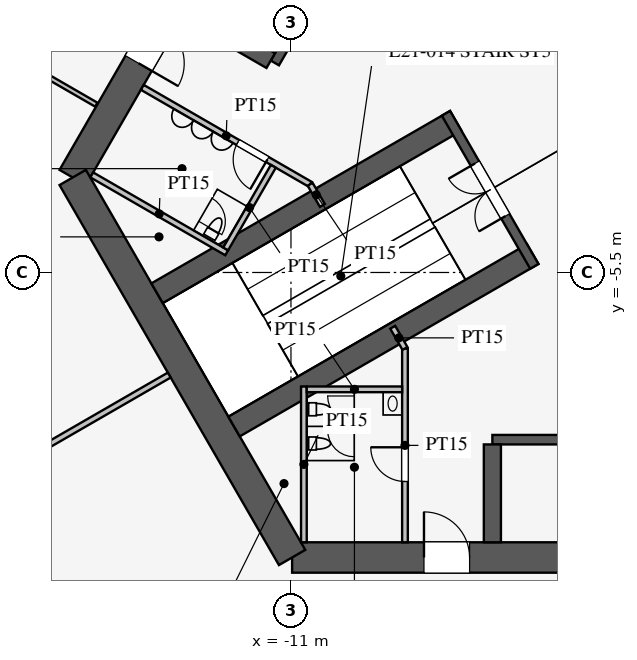
"""IFC4 building model, lengths in metres.
Left out: names, types, materials, properties, quantities, classifications, styles, units other than length and angle.
Written with IfcOpenShell. Run it as: python <this file> out.ifc"""

import sys

from ifc_helpers import new_model, si_unit, direction, frame, frame_2d, origin, place, context, subcontext, project, spatial, rectangle, extrude, element, fill, save


model = new_model("IFC4")
c1 = context("Model", 3, precision=1e-05, world=origin(), true_north=direction((0.0, 1.0)))
c2 = subcontext(c1, "Body", "Model", "MODEL_VIEW")
j1 = project(units=[si_unit("LENGTHUNIT", "METRE"), si_unit("PLANEANGLEUNIT", "RADIAN")], contexts=[c1])
p1 = place(None, origin())
s1 = spatial("IfcSite", under=j1, at=p1, CompositionType="ELEMENT")
p2 = place(p1, origin())
s2 = spatial("IfcBuilding", under=s1, at=p2, CompositionType="ELEMENT")
p3 = place(p2, frame((0.0, 0.0, 92.1)))
s3 = spatial("IfcBuildingStorey", under=s2, at=p3, CompositionType="ELEMENT", Elevation=92.1)
p4 = place(p3, frame((-10.97, -13.0, 0.0), z_axis=(0.0, 0.0, 1.0), x_axis=(1.0, 0.0, 0.0)))
e1 = element("IfcWall", 1, at=p4, inside=s3, PredefinedType="SHEAR", context=c2, shape_type="SweptSolid", body=[
    extrude(rectangle(XDim=21.939, YDim=0.8, at=frame_2d((10.97, 0.0))), origin(), (0.0, 0.0, 1.0), 6.0),
])
p5 = place(p4, frame((17.27, 0.0, 0.0)))
e2 = element("IfcOpeningElement", 2, at=p5, cuts=e1, PredefinedType="OPENING", context=c2, shape_type="SweptSolid", body=[
    extrude(rectangle(XDim=1.2, YDim=2.1, at=frame_2d((0.6, 1.05))), frame((0.0, 0.41, 0.0), z_axis=(0.0, -1.0, 0.0), x_axis=(1.0, 0.0, 0.0)), (0.0, 0.0, 1.0), 0.82),
])
p6 = place(p4, frame((3.47, 0.0, 0.0)))
e3 = element("IfcOpeningElement", 3, at=p6, cuts=e1, PredefinedType="OPENING", context=c2, shape_type="SweptSolid", body=[
    extrude(rectangle(XDim=1.2, YDim=2.1, at=frame_2d((0.6, 1.05))), frame((0.0, 0.41, 0.0), z_axis=(0.0, -1.0, 0.0), x_axis=(1.0, 0.0, 0.0)), (0.0, 0.0, 1.0), 0.82),
])
p7 = place(p3, frame((-5.773, 16.0, 0.0), z_axis=(0.0, 0.0, 1.0), x_axis=(-0.500002442456, -0.866023993627, 0.0)))
e4 = element("IfcWall", 4, at=p7, inside=s3, PredefinedType="SHEAR", context=c2, shape_type="SweptSolid", body=[
    extrude(rectangle(XDim=21.939, YDim=0.8, at=frame_2d((10.97, 0.0))), origin(), (0.0, 0.0, 1.0), 6.0),
])
p8 = place(p7, frame((17.27, 0.0, 0.0)))
e5 = element("IfcOpeningElement", 5, at=p8, cuts=e4, PredefinedType="OPENING", context=c2, shape_type="SweptSolid", body=[
    extrude(rectangle(XDim=1.2, YDim=2.1, at=frame_2d((0.6, 1.05))), frame((0.0, 0.41, 0.0), z_axis=(0.0, -1.0, 0.0), x_axis=(1.0, 0.0, 0.0)), (0.0, 0.0, 1.0), 0.82),
])
p9 = place(p7, frame((3.47, 0.0, 0.0)))
e6 = element("IfcOpeningElement", 6, at=p9, cuts=e4, PredefinedType="OPENING", context=c2, shape_type="SweptSolid", body=[
    extrude(rectangle(XDim=1.2, YDim=2.1, at=frame_2d((0.6, 1.05))), frame((0.0, 0.41, 0.0), z_axis=(0.0, -1.0, 0.0), x_axis=(1.0, 0.0, 0.0)), (0.0, 0.0, 1.0), 0.82),
])
p10 = place(p3, frame((-16.743, -3.0, 0.0), z_axis=(0.0, 0.0, 1.0), x_axis=(0.499995765644, -0.866027848477, 0.0)))
e7 = element("IfcWall", 7, at=p10, inside=s3, PredefinedType="SHEAR", context=c2, shape_type="SweptSolid", body=[
    extrude(rectangle(XDim=11.547, YDim=0.8, at=frame_2d((5.773, 0.0))), origin(), (0.0, 0.0, 1.0), 6.0),
])
p11 = place(p3, frame((-5.7, -9.9, 0.0), z_axis=(0.0, 0.0, 1.0), x_axis=(1.0, 0.0, 0.0)))
e8 = element("IfcWall", 8, at=p11, inside=s3, PredefinedType="SHEAR", context=c2, shape_type="SweptSolid", body=[
    extrude(rectangle(XDim=11.4, YDim=0.25, at=frame_2d((5.7, 0.0))), origin(), (0.0, 0.0, 1.0), 6.0),
])
p12 = place(p3, frame((-5.7, -10.025, 0.0), z_axis=(0.0, 0.0, 1.0), x_axis=(0.0, -1.0, 0.0)))
e9 = element("IfcWall", 9, at=p12, inside=s3, PredefinedType="SHEAR", context=c2, shape_type="SweptSolid", body=[
    extrude(rectangle(XDim=2.575, YDim=0.45, at=frame_2d((1.288, 0.0))), origin(), (0.0, 0.0, 1.0), 6.0),
])
p13 = place(p3, frame((-5.724, 9.886, 0.0), z_axis=(0.0, 0.0, 1.0), x_axis=(-0.500001763848, -0.866024385424, 0.0)))
e10 = element("IfcWall", 10, at=p13, inside=s3, PredefinedType="SHEAR", context=c2, shape_type="SweptSolid", body=[
    extrude(rectangle(XDim=11.4, YDim=0.25, at=frame_2d((5.7, 0.0))), origin(), (0.0, 0.0, 1.0), 6.0),
])
p14 = place(p13, frame((6.525, 0.0, 0.0)))
e11 = element("IfcOpeningElement", 11, at=p14, cuts=e10, PredefinedType="OPENING", context=c2, shape_type="SweptSolid", body=[
    extrude(rectangle(XDim=1.2, YDim=2.2, at=frame_2d((0.6, 1.1))), frame((0.0, 0.135, 0.0), z_axis=(0.0, -1.0, 0.0), x_axis=(1.0, 0.0, 0.0)), (0.0, 0.0, 1.0), 0.27),
])
p15 = place(p13, frame((9.375, 0.0, 0.0)))
e12 = element("IfcOpeningElement", 12, at=p15, cuts=e10, PredefinedType="OPENING", context=c2, shape_type="SweptSolid", body=[
    extrude(rectangle(XDim=1.2, YDim=2.2, at=frame_2d((0.6, 1.1))), frame((0.0, 0.135, 0.0), z_axis=(0.0, -1.0, 0.0), x_axis=(1.0, 0.0, 0.0)), (0.0, 0.0, 1.0), 0.27),
])
p16 = place(p3, frame((-11.532, 0.076, 0.0), z_axis=(0.0, 0.0, 1.0), x_axis=(-0.866005588531, 0.500034319456, 0.0)))
e13 = element("IfcWall", 13, at=p16, inside=s3, PredefinedType="SHEAR", context=c2, shape_type="SweptSolid", body=[
    extrude(rectangle(XDim=2.575, YDim=0.45, at=frame_2d((1.288, 0.0))), origin(), (0.0, 0.0, 1.0), 6.0),
])
for number, where, z_axis, x_axis in (
    (14, (-6.663, -1.509, 0.0), (0.0, 0.0, 1.0), (-0.866, -0.5, 0.0)),
    (15, (-4.638, -5.016, 0.0), (0.0, 0.0, 1.0), (-0.866, -0.5, 0.0)),
):
    element("IfcWall", number, at=place(p3, frame(where, z_axis=z_axis, x_axis=x_axis)), inside=s3, PredefinedType="SHEAR", context=c2, shape_type="SweptSolid", body=[
        extrude(rectangle(XDim=9.075, YDim=0.6, at=frame_2d((4.538, 0.0))), origin(), (0.0, 0.0, 1.0), 6.0),
    ])
p17 = place(p3, frame((-6.922, -1.312, 0.0), z_axis=(0.0, 0.0, 1.0), x_axis=(0.499984536904, -0.866034331223, 0.0)))
e16 = element("IfcWall", 16, at=p17, inside=s3, PredefinedType="SHEAR", context=c2, shape_type="SweptSolid", body=[
    extrude(rectangle(XDim=4.65, YDim=0.25, at=frame_2d((2.325, 0.0))), origin(), (0.0, 0.0, 1.0), 6.0),
])
p18 = place(p17, frame((1.525, 0.0, 0.0)))
e17 = element("IfcOpeningElement", 17, at=p18, cuts=e16, PredefinedType="OPENING", context=c2, shape_type="SweptSolid", body=[
    extrude(rectangle(XDim=1.6, YDim=2.1, at=frame_2d((0.8, 1.05))), frame((0.0, 0.135, 0.0), z_axis=(0.0, -1.0, 0.0), x_axis=(1.0, 0.0, 0.0)), (0.0, 0.0, 1.0), 0.27),
])
p19 = place(p3, frame((-8.0, -7.5, 0.0), z_axis=(0.0, 0.0, 1.0), x_axis=(0.0, -1.0, 0.0)))
e18 = element("IfcWall", 18, at=p19, inside=s3, PredefinedType="PARTITIONING", context=c2, shape_type="SweptSolid", body=[
    extrude(rectangle(XDim=5.1, YDim=0.15, at=frame_2d((2.55, 0.0))), origin(), (0.0, 0.0, 1.0), 5.8),
])
p20 = place(p19, frame((2.6, 0.0, 0.0)))
e19 = element("IfcOpeningElement", 19, at=p20, cuts=e18, PredefinedType="OPENING", context=c2, shape_type="SweptSolid", body=[
    extrude(rectangle(XDim=0.9, YDim=2.1, at=frame_2d((0.45, 1.05))), frame((0.0, 0.085, 0.0), z_axis=(0.0, -1.0, 0.0), x_axis=(1.0, 0.0, 0.0)), (0.0, 0.0, 1.0), 0.17),
])
p21 = place(p3, frame((-10.495, -3.178, 0.0), z_axis=(0.0, 0.0, 1.0), x_axis=(-0.86602216432, 0.500005610874, 0.0)))
e20 = element("IfcWall", 20, at=p21, inside=s3, PredefinedType="PARTITIONING", context=c2, shape_type="SweptSolid", body=[
    extrude(rectangle(XDim=5.1, YDim=0.15, at=frame_2d((2.55, 0.0))), origin(), (0.0, 0.0, 1.0), 5.8),
])
p22 = place(p21, frame((1.3, 0.0, 0.0)))
e21 = element("IfcOpeningElement", 21, at=p22, cuts=e20, PredefinedType="OPENING", context=c2, shape_type="SweptSolid", body=[
    extrude(rectangle(XDim=0.9, YDim=2.1, at=frame_2d((0.45, 1.05))), frame((0.0, 0.085, 0.0), z_axis=(0.0, -1.0, 0.0), x_axis=(1.0, 0.0, 0.0)), (0.0, 0.0, 1.0), 0.17),
])
for number, where, z_axis, x_axis in (
    (22, (-10.495, -3.178, 0.0), (0.0, 0.0, 1.0), (0.5, -0.866, 0.0)),
    (23, (-8.0, -7.5, 0.0), (0.0, 0.0, 1.0), (-0.5, 0.866, 0.0)),
):
    element("IfcWall", number, at=place(p3, frame(where, z_axis=z_axis, x_axis=x_axis)), inside=s3, PredefinedType="PARTITIONING", context=c2, shape_type="SweptSolid", body=[
        extrude(rectangle(XDim=0.645, YDim=0.15, at=frame_2d((0.323, 0.0))), origin(), (0.0, 0.0, 1.0), 5.8),
    ])
p23 = place(p3, frame((-12.691, -4.982, 0.0), z_axis=(0.0, 0.0, 1.0), x_axis=(-0.8660249478, 0.500000789788, 0.0)))
e24 = element("IfcWall", 24, at=p23, inside=s3, PredefinedType="PARTITIONING", context=c2, shape_type="SweptSolid", body=[
    extrude(rectangle(XDim=4.1, YDim=0.15, at=frame_2d((2.05, 0.0))), origin(), (0.0, 0.0, 1.0), 5.8),
])
p24 = place(p3, frame((-11.464, -2.706, 0.0), z_axis=(0.0, 0.0, 1.0), x_axis=(-0.50001992892, -0.866013897511, 0.0)))
e25 = element("IfcWall", 25, at=p24, inside=s3, PredefinedType="PARTITIONING", context=c2, shape_type="SweptSolid", body=[
    extrude(rectangle(XDim=2.51, YDim=0.15, at=frame_2d((1.255, 0.0))), origin(), (0.0, 0.0, 1.0), 5.8),
])
p25 = place(p3, frame((-10.66, -8.5, 0.0), z_axis=(0.0, 0.0, 1.0), x_axis=(0.0, -1.0, 0.0)))
e26 = element("IfcWall", 26, at=p25, inside=s3, PredefinedType="PARTITIONING", context=c2, shape_type="SweptSolid", body=[
    extrude(rectangle(XDim=4.1, YDim=0.15, at=frame_2d((2.05, 0.0))), origin(), (0.0, 0.0, 1.0), 5.8),
])
p26 = place(p3, frame((-8.075, -8.575, 0.0), z_axis=(0.0, 0.0, 1.0), x_axis=(-1.0, 0.0, 0.0)))
e27 = element("IfcWall", 27, at=p26, inside=s3, PredefinedType="PARTITIONING", context=c2, shape_type="SweptSolid", body=[
    extrude(rectangle(XDim=2.51, YDim=0.15, at=frame_2d((1.255, 0.0))), origin(), (0.0, 0.0, 1.0), 5.8),
])
p27 = place(p3, frame((-14.203, -8.2, 0.0), z_axis=(0.0, 0.0, 1.0), x_axis=(-0.866024668836, -0.500001272966, 0.0)))
e28 = element("IfcWall", 28, at=p27, inside=s3, PredefinedType="PARTITIONING", context=c2, shape_type="SweptSolid", body=[
    extrude(rectangle(XDim=16.65, YDim=0.15, at=frame_2d((8.325, 0.0))), origin(), (0.0, 0.0, 1.0), 4.1),
])
p28 = place(p3, frame((-16.122, -1.084, 0.0), z_axis=(0.0, 0.0, 1.0), x_axis=(-0.866023947468, 0.500002522405, 0.0)))
e29 = element("IfcWall", 29, at=p28, inside=s3, PredefinedType="PARTITIONING", context=c2, shape_type="SweptSolid", body=[
    extrude(rectangle(XDim=11.771, YDim=0.12, at=frame_2d((5.886, 0.0))), origin(), (0.0, 0.0, 1.0), 2.9),
])
p29 = place(p28, frame((2.5, 0.0, 0.0)))
e30 = element("IfcOpeningElement", 30, at=p29, cuts=e29, PredefinedType="OPENING", context=c2, shape_type="SweptSolid", body=[
    extrude(rectangle(XDim=1.8, YDim=2.1, at=frame_2d((0.9, 1.05))), frame((0.0, 0.07, 0.0), z_axis=(0.0, -1.0, 0.0), x_axis=(1.0, 0.0, 0.0)), (0.0, 0.0, 1.0), 0.14),
])
p30 = place(p28, frame((7.6, 0.0, 0.0)))
e31 = element("IfcOpeningElement", 31, at=p30, cuts=e29, PredefinedType="OPENING", context=c2, shape_type="SweptSolid", body=[
    extrude(rectangle(XDim=1.8, YDim=2.1, at=frame_2d((0.9, 1.05))), frame((0.0, 0.07, 0.0), z_axis=(0.0, -1.0, 0.0), x_axis=(1.0, 0.0, 0.0)), (0.0, 0.0, 1.0), 0.14),
])
p31 = place(p20, frame((0.9, 0.0, 0.0), z_axis=(0.0, 0.0, 1.0), x_axis=(-1.0, 0.0, 0.0)))
e32 = element("IfcDoor", 32, at=p31, inside=s3, OperationType="SINGLE_SWING_RIGHT", PredefinedType="DOOR", context=c2, shape_type="SweptSolid", body=[
    extrude(rectangle(XDim=0.9, YDim=2.1, at=frame_2d((0.45, 1.05))), frame((0.0, 0.025, 0.0), z_axis=(0.0, -1.0, 0.0), x_axis=(1.0, 0.0, 0.0)), (0.0, 0.0, 1.0), 0.05),
])
fill(e19, e32)
p32 = place(p22, origin())
e33 = element("IfcDoor", 33, at=p32, inside=s3, OperationType="SINGLE_SWING_LEFT", PredefinedType="DOOR", context=c2, shape_type="SweptSolid", body=[
    extrude(rectangle(XDim=0.9, YDim=2.1, at=frame_2d((0.45, 1.05))), frame((0.0, 0.025, 0.0), z_axis=(0.0, -1.0, 0.0), x_axis=(1.0, 0.0, 0.0)), (0.0, 0.0, 1.0), 0.05),
])
fill(e21, e33)
p33 = place(p18, frame((1.6, 0.0, 0.0), z_axis=(0.0, 0.0, 1.0), x_axis=(-1.0, 0.0, 0.0)))
e34 = element("IfcDoor", 34, at=p33, inside=s3, OperationType="DOUBLE_DOOR_SINGLE_SWING", PredefinedType="DOOR", context=c2, shape_type="SweptSolid", body=[
    extrude(rectangle(XDim=1.6, YDim=2.1, at=frame_2d((0.8, 1.05))), frame((0.0, 0.025, 0.0), z_axis=(0.0, -1.0, 0.0), x_axis=(1.0, 0.0, 0.0)), (0.0, 0.0, 1.0), 0.05),
])
fill(e17, e34)
p34 = place(p6, origin())
e35 = element("IfcDoor", 35, at=p34, inside=s3, OperationType="SINGLE_SWING_LEFT", PredefinedType="DOOR", context=c2, shape_type="SweptSolid", body=[
    extrude(rectangle(XDim=1.2, YDim=2.1, at=frame_2d((0.6, 1.05))), frame((0.0, 0.025, 0.0), z_axis=(0.0, -1.0, 0.0), x_axis=(1.0, 0.0, 0.0)), (0.0, 0.0, 1.0), 0.05),
])
fill(e3, e35)
p35 = place(p8, origin())
e36 = element("IfcDoor", 36, at=p35, inside=s3, OperationType="SINGLE_SWING_RIGHT", PredefinedType="DOOR", context=c2, shape_type="SweptSolid", body=[
    extrude(rectangle(XDim=1.2, YDim=2.1, at=frame_2d((0.6, 1.05))), frame((0.0, 0.025, 0.0), z_axis=(0.0, -1.0, 0.0), x_axis=(1.0, 0.0, 0.0)), (0.0, 0.0, 1.0), 0.05),
])
fill(e5, e36)
save(model, sys.argv[1])
